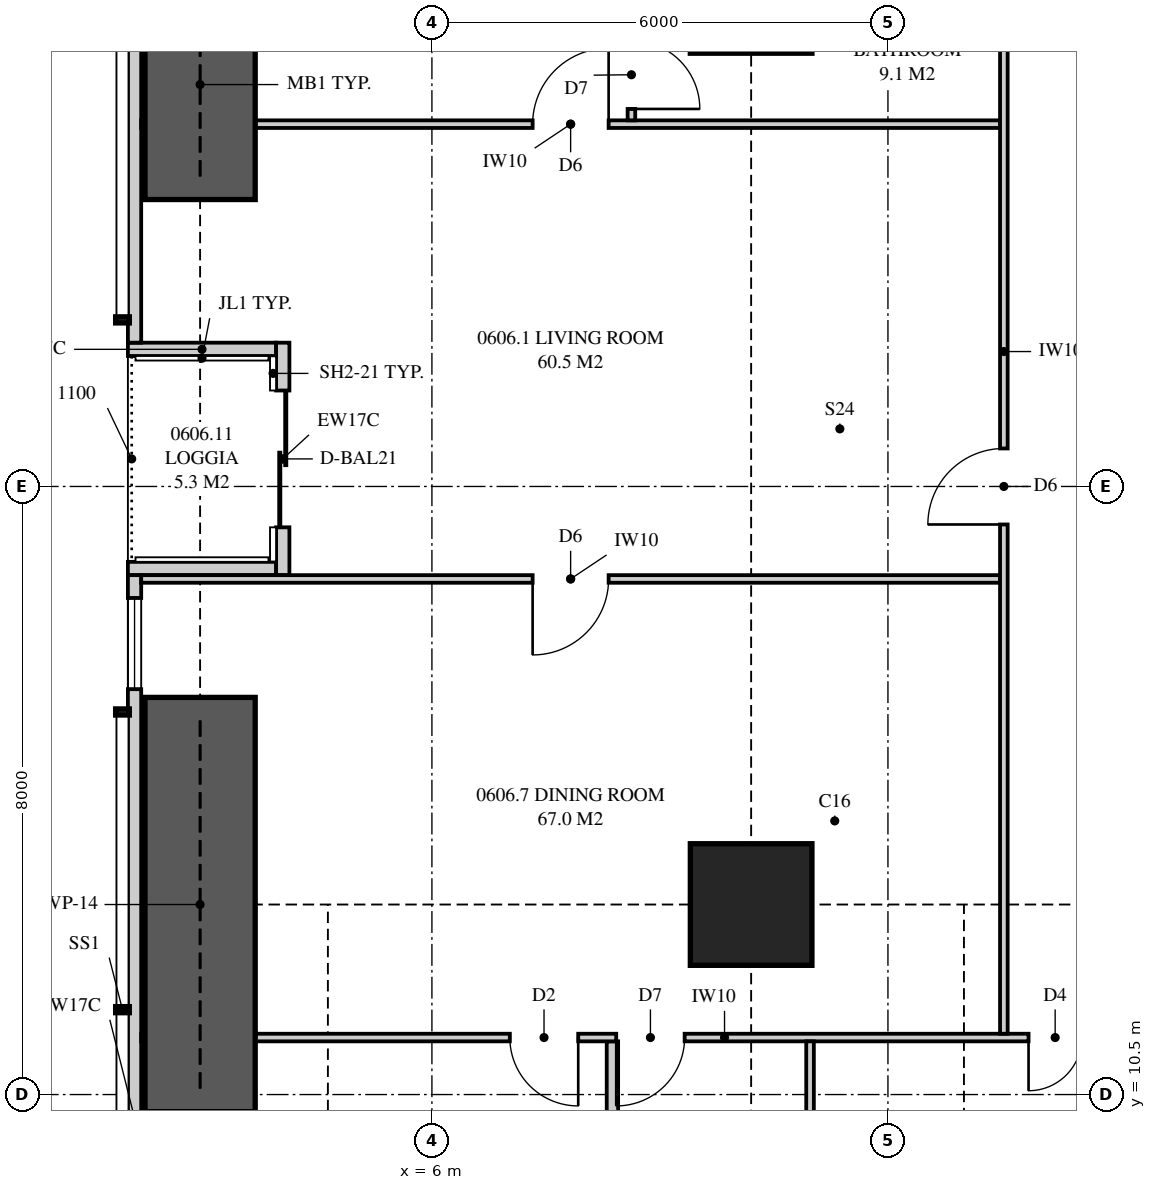
"""IFC4 building model, lengths in metres.
Left out: names, types, materials, properties, quantities, classifications, styles, units other than length and angle.
Written with IfcOpenShell. Run it as: python <this file> out.ifc"""

import sys

from ifc_helpers import new_model, si_unit, direction, frame, frame_2d, origin, origin_2d, place, context, subcontext, project, spatial, polyline, rectangle, outline, extrude, element, fill, save


model = new_model("IFC4")
c1 = context("Model", 3, precision=1e-05, world=origin(), true_north=direction((0.0, 1.0)))
c2 = subcontext(c1, "Body", "Model", "MODEL_VIEW")
j1 = project(units=[si_unit("LENGTHUNIT", "METRE"), si_unit("PLANEANGLEUNIT", "RADIAN")], contexts=[c1])
p1 = place(None, origin())
s1 = spatial("IfcSite", under=j1, at=p1, CompositionType="ELEMENT")
p2 = place(p1, origin())
s2 = spatial("IfcBuilding", under=s1, at=p2, CompositionType="ELEMENT")
p3 = place(p2, frame((0.0, 0.0, 27.7)))
s3 = spatial("IfcBuildingStorey", under=s2, at=p3, CompositionType="ELEMENT", Elevation=27.7)
for number, where, z_axis, x_axis in (
    (1, (10.2, 13.0, 0.0), (0.0, 0.0, 1.0), (1.0, 0.0, 0.0)),
    (2, (10.2, 25.0, 0.0), (0.0, 0.0, 1.0), (1.0, 0.0, 0.0)),
):
    element("IfcColumn", number, at=place(p3, frame(where, z_axis=z_axis, x_axis=x_axis)), inside=s3, PredefinedType="COLUMN", context=c2, shape_type="SweptSolid", body=[
        extrude(rectangle(XDim=1.6, YDim=1.6, at=origin_2d()), origin(), (0.0, 0.0, 1.0), 3.35),
    ])
p4 = place(p3, frame((2.087, 34.949, 0.0), z_axis=(0.0, 0.0, 1.0), x_axis=(0.0, -1.0, 0.0)))
e3 = element("IfcWall", 3, at=p4, inside=s3, PredefinedType="SOLIDWALL", context=c2, shape_type="SweptSolid", body=[
    extrude(outline(polyline([(0.0, 0.0), (14.557, 0.0), (14.557, 2.15), (9.949, 2.15), (9.949, 3.11), (9.823, 3.11), (9.823, 2.15), (9.73, 2.15), (9.73, 3.11), (0.0, 3.11), (0.0, 0.0)])), frame((0.0, 0.087, 0.0), z_axis=(0.0, -1.0, 0.0), x_axis=(1.0, 0.0, 0.0)), (0.0, 0.0, 1.0), 0.175),
])
p5 = place(p4, frame((2.757, 0.0, 0.4)))
e4 = element("IfcOpeningElement", 4, at=p5, cuts=e3, PredefinedType="OPENING", context=c2, shape_type="SweptSolid", body=[
    extrude(rectangle(XDim=1.8, YDim=1.7, at=frame_2d((0.9, 0.85))), frame((0.0, 0.097, 0.0), z_axis=(0.0, -1.0, 0.0), x_axis=(1.0, 0.0, 0.0)), (0.0, 0.0, 1.0), 0.195),
])
p6 = place(p4, frame((5.899, 0.0, 0.4)))
e5 = element("IfcOpeningElement", 5, at=p6, cuts=e3, PredefinedType="OPENING", context=c2, shape_type="SweptSolid", body=[
    extrude(rectangle(XDim=1.2, YDim=1.7, at=frame_2d((0.6, 0.85))), frame((0.0, 0.097, 0.0), z_axis=(0.0, -1.0, 0.0), x_axis=(1.0, 0.0, 0.0)), (0.0, 0.0, 1.0), 0.195),
])
p7 = place(p3, frame((2.087, 17.333, 0.0), z_axis=(0.0, 0.0, 1.0), x_axis=(0.0, -1.0, 0.0)))
e6 = element("IfcWall", 6, at=p7, inside=s3, PredefinedType="SOLIDWALL", context=c2, shape_type="SweptSolid", body=[
    extrude(outline(polyline([(0.0, 0.0), (14.282, 0.0), (14.282, 3.11), (4.552, 3.11), (4.552, 2.15), (4.459, 2.15), (4.459, 3.11), (4.333, 3.11), (4.333, 2.15), (0.0, 2.15), (0.0, 0.0)])), frame((0.0, 0.087, 0.0), z_axis=(0.0, -1.0, 0.0), x_axis=(1.0, 0.0, 0.0)), (0.0, 0.0, 1.0), 0.175),
])
p8 = place(p7, frame((0.3, 0.0, 0.4)))
e7 = element("IfcOpeningElement", 7, at=p8, cuts=e6, PredefinedType="OPENING", context=c2, shape_type="SweptSolid", body=[
    extrude(rectangle(XDim=1.2, YDim=1.7, at=frame_2d((0.6, 0.85))), frame((0.0, 0.097, 0.0), z_axis=(0.0, -1.0, 0.0), x_axis=(1.0, 0.0, 0.0)), (0.0, 0.0, 1.0), 0.195),
])
p9 = place(p7, frame((7.158, 0.0, 0.4)))
e8 = element("IfcOpeningElement", 8, at=p9, cuts=e6, PredefinedType="OPENING", context=c2, shape_type="SweptSolid", body=[
    extrude(rectangle(XDim=1.8, YDim=1.7, at=frame_2d((0.9, 0.85))), frame((0.0, 0.097, 0.0), z_axis=(0.0, -1.0, 0.0), x_axis=(1.0, 0.0, 0.0)), (0.0, 0.0, 1.0), 0.195),
])
p10 = place(p7, frame((10.225, 0.0, 0.4)))
e9 = element("IfcOpeningElement", 9, at=p10, cuts=e6, PredefinedType="OPENING", context=c2, shape_type="SweptSolid", body=[
    extrude(rectangle(XDim=1.8, YDim=1.7, at=frame_2d((0.9, 0.85))), frame((0.0, 0.097, 0.0), z_axis=(0.0, -1.0, 0.0), x_axis=(1.0, 0.0, 0.0)), (0.0, 0.0, 1.0), 0.195),
])
p11 = place(p3, frame((4.038, 20.392, 0.0), z_axis=(0.0, 0.0, 1.0), x_axis=(0.0, -1.0, 0.0)))
e10 = element("IfcWall", 10, at=p11, inside=s3, PredefinedType="SOLIDWALL", context=c2, shape_type="SweptSolid", body=[
    extrude(rectangle(XDim=3.058, YDim=0.175, at=frame_2d((1.529, 0.0))), origin(), (0.0, 0.0, 1.0), 3.11),
])
p12 = place(p11, frame((0.629, 0.0, 0.0)))
e11 = element("IfcOpeningElement", 11, at=p12, cuts=e10, PredefinedType="OPENING", context=c2, shape_type="SweptSolid", body=[
    extrude(rectangle(XDim=1.8, YDim=2.1, at=frame_2d((0.9, 1.05))), frame((0.0, 0.097, 0.0), z_axis=(0.0, -1.0, 0.0), x_axis=(1.0, 0.0, 0.0)), (0.0, 0.0, 1.0), 0.195),
])
for number, where, z_axis, x_axis in (
    (12, (2.0, 20.304, 0.0), (0.0, 0.0, 1.0), (1.0, 0.0, 0.0)),
    (13, (2.0, 17.421, 0.0), (0.0, 0.0, 1.0), (1.0, 0.0, 0.0)),
):
    element("IfcWall", number, at=place(p3, frame(where, z_axis=z_axis, x_axis=x_axis)), inside=s3, PredefinedType="SOLIDWALL", context=c2, shape_type="SweptSolid", body=[
        extrude(outline(polyline([(0.0, 0.0), (1.95, 0.0), (1.95, 3.11), (1.75, 3.11), (1.75, 2.15), (0.15, 2.15), (0.15, 3.11), (0.0, 3.11), (0.0, 0.0)])), frame((0.0, 0.087, 0.0), z_axis=(0.0, -1.0, 0.0), x_axis=(1.0, 0.0, 0.0)), (0.0, 0.0, 1.0), 0.175),
    ])
p13 = place(p3, frame((2.175, 11.25, 0.0), z_axis=(0.0, 0.0, 1.0), x_axis=(1.0, 0.0, 0.0)))
e14 = element("IfcWall", 14, at=p13, inside=s3, PredefinedType="PARTITIONING", context=c2, shape_type="SweptSolid", body=[
    extrude(outline(polyline([(0.188, 3.11), (0.0, 3.11), (0.0, 0.0), (0.529, 0.0), (0.529, 0.263), (1.021, 0.263), (1.021, 0.0), (15.35, 0.0), (15.35, 3.11), (11.112, 3.11), (11.112, 2.541), (10.538, 2.541), (10.538, 3.11), (9.285, 3.11), (9.285, 2.51), (6.765, 2.51), (6.765, 3.11), (2.744, 3.11), (2.744, 2.541), (2.169, 2.541), (2.169, 3.11), (1.93, 3.11), (1.93, 2.15), (1.021, 2.15), (1.021, 1.887), (0.529, 1.887), (0.529, 2.15), (0.188, 2.15), (0.188, 3.11)])), frame((0.0, 0.05, 0.0), z_axis=(0.0, -1.0, 0.0), x_axis=(1.0, 0.0, 0.0)), (0.0, 0.0, 1.0), 0.1),
])
p14 = place(p13, frame((4.85, 0.0, 0.0)))
e15 = element("IfcOpeningElement", 15, at=p14, cuts=e14, PredefinedType="OPENING", context=c2, shape_type="SweptSolid", body=[
    extrude(rectangle(XDim=0.9, YDim=2.1, at=frame_2d((0.45, 1.05))), frame((0.0, 0.06, 0.0), z_axis=(0.0, -1.0, 0.0), x_axis=(1.0, 0.0, 0.0)), (0.0, 0.0, 1.0), 0.12),
])
p15 = place(p13, frame((6.25, 0.0, 0.0)))
e16 = element("IfcOpeningElement", 16, at=p15, cuts=e14, PredefinedType="OPENING", context=c2, shape_type="SweptSolid", body=[
    extrude(rectangle(XDim=0.9, YDim=2.1, at=frame_2d((0.45, 1.05))), frame((0.0, 0.06, 0.0), z_axis=(0.0, -1.0, 0.0), x_axis=(1.0, 0.0, 0.0)), (0.0, 0.0, 1.0), 0.12),
])
p16 = place(p13, frame((11.675, 0.0, 0.0)))
e17 = element("IfcOpeningElement", 17, at=p16, cuts=e14, PredefinedType="OPENING", context=c2, shape_type="SweptSolid", body=[
    extrude(rectangle(XDim=0.7, YDim=2.1, at=frame_2d((0.35, 1.05))), frame((0.0, 0.06, 0.0), z_axis=(0.0, -1.0, 0.0), x_axis=(1.0, 0.0, 0.0)), (0.0, 0.0, 1.0), 0.12),
])
p17 = place(p3, frame((8.375, 7.75, 0.0), z_axis=(0.0, 0.0, 1.0), x_axis=(0.0, 1.0, 0.0)))
e18 = element("IfcWall", 18, at=p17, inside=s3, PredefinedType="PLUMBINGWALL", context=c2, shape_type="SweptSolid", body=[
    extrude(rectangle(XDim=3.45, YDim=0.15, at=frame_2d((1.725, 0.0))), origin(), (0.0, 0.0, 1.0), 3.11),
])
p18 = place(p3, frame((10.975, 7.75, 0.0), z_axis=(0.0, 0.0, 1.0), x_axis=(0.0, 1.0, 0.0)))
e19 = element("IfcWall", 19, at=p18, inside=s3, PredefinedType="PARTITIONING", context=c2, shape_type="SweptSolid", body=[
    extrude(outline(polyline([(0.0, 0.0), (3.45, 0.0), (3.45, 3.11), (3.45, 2.51), (0.0, 2.51), (0.0, 3.11), (0.0, 0.0)])), frame((0.0, 0.05, 0.0), z_axis=(0.0, -1.0, 0.0), x_axis=(1.0, 0.0, 0.0)), (0.0, 0.0, 1.0), 0.1),
])
p19 = place(p3, frame((13.525, 11.3, 0.0), z_axis=(0.0, 0.0, 1.0), x_axis=(0.0, 1.0, 0.0)))
e20 = element("IfcWall", 20, at=p19, inside=s3, PredefinedType="PARTITIONING", context=c2, shape_type="SweptSolid", body=[
    extrude(outline(polyline([(0.0, 0.0), (17.95, 0.0), (17.95, 3.11), (13.987, 3.11), (13.987, 2.541), (13.413, 2.541), (13.413, 3.11), (1.987, 3.11), (1.987, 2.541), (1.413, 2.541), (1.413, 3.11), (0.0, 3.11), (0.0, 0.0)])), frame((0.0, 0.05, 0.0), z_axis=(0.0, -1.0, 0.0), x_axis=(1.0, 0.0, 0.0)), (0.0, 0.0, 1.0), 0.1),
])
p20 = place(p19, frame((6.7, 0.0, 0.0)))
e21 = element("IfcOpeningElement", 21, at=p20, cuts=e20, PredefinedType="OPENING", context=c2, shape_type="SweptSolid", body=[
    extrude(rectangle(XDim=1.0, YDim=2.1, at=frame_2d((0.5, 1.05))), frame((0.0, 0.06, 0.0), z_axis=(0.0, -1.0, 0.0), x_axis=(1.0, 0.0, 0.0)), (0.0, 0.0, 1.0), 0.12),
])
p21 = place(p3, frame((2.175, 17.283, 0.0), z_axis=(0.0, 0.0, 1.0), x_axis=(1.0, 0.0, 0.0)))
e22 = element("IfcWall", 22, at=p21, inside=s3, PredefinedType="PARTITIONING", context=c2, shape_type="SweptSolid", body=[
    extrude(outline(polyline([(0.0, 0.0), (11.3, 0.0), (11.3, 3.11), (9.285, 3.11), (9.285, 2.51), (6.765, 2.51), (6.765, 3.11), (1.635, 3.11), (1.635, 2.15), (0.0, 2.15), (0.0, 3.11), (0.0, 0.0)])), frame((0.0, 0.05, 0.0), z_axis=(0.0, -1.0, 0.0), x_axis=(1.0, 0.0, 0.0)), (0.0, 0.0, 1.0), 0.1),
])
p22 = place(p21, frame((5.15, 0.0, 0.0)))
e23 = element("IfcOpeningElement", 23, at=p22, cuts=e22, PredefinedType="OPENING", context=c2, shape_type="SweptSolid", body=[
    extrude(rectangle(XDim=1.0, YDim=2.1, at=frame_2d((0.5, 1.05))), frame((0.0, 0.06, 0.0), z_axis=(0.0, -1.0, 0.0), x_axis=(1.0, 0.0, 0.0)), (0.0, 0.0, 1.0), 0.12),
])
p23 = place(p3, frame((2.175, 23.267, 0.0), z_axis=(0.0, 0.0, 1.0), x_axis=(1.0, 0.0, 0.0)))
e24 = element("IfcWall", 24, at=p23, inside=s3, PredefinedType="PARTITIONING", context=c2, shape_type="SweptSolid", body=[
    extrude(outline(polyline([(0.529, 2.15), (0.0, 2.15), (0.0, 0.0), (0.529, 0.0), (0.529, 0.274), (1.021, 0.274), (1.021, 0.0), (11.3, 0.0), (11.3, 3.11), (9.285, 3.11), (9.285, 2.51), (6.765, 2.51), (6.765, 3.11), (1.635, 3.11), (1.635, 2.15), (1.021, 2.15), (1.021, 1.876), (0.529, 1.876), (0.529, 2.15)])), frame((0.0, 0.05, 0.0), z_axis=(0.0, -1.0, 0.0), x_axis=(1.0, 0.0, 0.0)), (0.0, 0.0, 1.0), 0.1),
])
p24 = place(p23, frame((5.15, 0.0, 0.0)))
e25 = element("IfcOpeningElement", 25, at=p24, cuts=e24, PredefinedType="OPENING", context=c2, shape_type="SweptSolid", body=[
    extrude(rectangle(XDim=1.0, YDim=2.1, at=frame_2d((0.5, 1.05))), frame((0.0, 0.06, 0.0), z_axis=(0.0, -1.0, 0.0), x_axis=(1.0, 0.0, 0.0)), (0.0, 0.0, 1.0), 0.12),
])
p25 = place(p3, frame((8.625, 23.317, 0.0), z_axis=(0.0, 0.0, 1.0), x_axis=(0.0, 1.0, 0.0)))
e26 = element("IfcWall", 26, at=p25, inside=s3, PredefinedType="PARTITIONING", context=c2, shape_type="SweptSolid", body=[
    extrude(outline(polyline([(0.0, 0.0), (5.933, 0.0), (5.933, 3.11), (1.971, 3.11), (1.971, 2.541), (1.396, 2.541), (1.396, 3.11), (0.0, 3.11), (0.0, 0.0)])), frame((0.0, 0.05, 0.0), z_axis=(0.0, -1.0, 0.0), x_axis=(1.0, 0.0, 0.0)), (0.0, 0.0, 1.0), 0.1),
])
p26 = place(p25, frame((0.15, 0.0, 0.0)))
e27 = element("IfcOpeningElement", 27, at=p26, cuts=e26, PredefinedType="OPENING", context=c2, shape_type="SweptSolid", body=[
    extrude(rectangle(XDim=0.9, YDim=2.1, at=frame_2d((0.45, 1.05))), frame((0.0, 0.06, 0.0), z_axis=(0.0, -1.0, 0.0), x_axis=(1.0, 0.0, 0.0)), (0.0, 0.0, 1.0), 0.12),
])
p27 = place(p25, frame((4.042, 0.0, 0.0)))
e28 = element("IfcOpeningElement", 28, at=p27, cuts=e26, PredefinedType="OPENING", context=c2, shape_type="SweptSolid", body=[
    extrude(rectangle(XDim=0.9, YDim=2.1, at=frame_2d((0.45, 1.05))), frame((0.0, 0.06, 0.0), z_axis=(0.0, -1.0, 0.0), x_axis=(1.0, 0.0, 0.0)), (0.0, 0.0, 1.0), 0.12),
])
for number, where, z_axis, x_axis in (
    (29, (2.95, 22.275, 0.0), (0.0, 0.0, 1.0), (0.0, 1.0, 0.0)),
    (30, (2.95, 10.275, 0.0), (0.0, 0.0, 1.0), (0.0, 1.0, 0.0)),
):
    element("IfcWall", number, at=place(p3, frame(where, z_axis=z_axis, x_axis=x_axis)), inside=s3, PredefinedType="SHEAR", context=c2, shape_type="SweptSolid", body=[
        extrude(rectangle(XDim=5.45, YDim=1.45, at=frame_2d((2.725, 0.0))), origin(), (0.0, 0.0, 1.0), 3.35),
    ])
p28 = place(p12, origin())
e31 = element("IfcDoor", 31, at=p28, inside=s3, OperationType="SLIDING_TO_LEFT", PredefinedType="DOOR", context=c2, shape_type="SweptSolid", body=[
    extrude(rectangle(XDim=1.8, YDim=2.1, at=frame_2d((0.9, 1.05))), frame((0.0, 0.025, 0.0), z_axis=(0.0, -1.0, 0.0), x_axis=(1.0, 0.0, 0.0)), (0.0, 0.0, 1.0), 0.05),
])
fill(e11, e31)
p29 = place(p8, origin())
e32 = element("IfcWindow", 32, at=p29, inside=s3, PartitioningType="SINGLE_PANEL", PredefinedType="WINDOW", context=c2, shape_type="SweptSolid", body=[
    extrude(rectangle(XDim=1.2, YDim=1.7, at=frame_2d((0.6, 0.85))), frame((0.0, 0.03, 0.0), z_axis=(0.0, -1.0, 0.0), x_axis=(1.0, 0.0, 0.0)), (0.0, 0.0, 1.0), 0.06),
])
fill(e7, e32)
p30 = place(p14, frame((0.9, 0.0, 0.0), z_axis=(0.0, 0.0, 1.0), x_axis=(-1.0, 0.0, 0.0)))
e33 = element("IfcDoor", 33, at=p30, inside=s3, OperationType="SINGLE_SWING_LEFT", PredefinedType="DOOR", context=c2, shape_type="SweptSolid", body=[
    extrude(rectangle(XDim=0.9, YDim=2.1, at=frame_2d((0.45, 1.05))), frame((0.0, 0.025, 0.0), z_axis=(0.0, -1.0, 0.0), x_axis=(1.0, 0.0, 0.0)), (0.0, 0.0, 1.0), 0.05),
])
fill(e15, e33)
p31 = place(p15, frame((0.9, 0.0, 0.0), z_axis=(0.0, 0.0, 1.0), x_axis=(-1.0, 0.0, 0.0)))
e34 = element("IfcDoor", 34, at=p31, inside=s3, OperationType="SINGLE_SWING_RIGHT", PredefinedType="DOOR", context=c2, shape_type="SweptSolid", body=[
    extrude(rectangle(XDim=0.9, YDim=2.1, at=frame_2d((0.45, 1.05))), frame((0.0, 0.025, 0.0), z_axis=(0.0, -1.0, 0.0), x_axis=(1.0, 0.0, 0.0)), (0.0, 0.0, 1.0), 0.05),
])
fill(e16, e34)
p32 = place(p16, frame((0.7, 0.0, 0.0), z_axis=(0.0, 0.0, 1.0), x_axis=(-1.0, 0.0, 0.0)))
e35 = element("IfcDoor", 35, at=p32, inside=s3, OperationType="SINGLE_SWING_RIGHT", PredefinedType="DOOR", context=c2, shape_type="SweptSolid", body=[
    extrude(rectangle(XDim=0.7, YDim=2.1, at=frame_2d((0.35, 1.05))), frame((0.0, 0.025, 0.0), z_axis=(0.0, -1.0, 0.0), x_axis=(1.0, 0.0, 0.0)), (0.0, 0.0, 1.0), 0.05),
])
fill(e17, e35)
p33 = place(p20, origin())
e36 = element("IfcDoor", 36, at=p33, inside=s3, OperationType="SINGLE_SWING_LEFT", PredefinedType="DOOR", context=c2, shape_type="SweptSolid", body=[
    extrude(rectangle(XDim=1.0, YDim=2.1, at=frame_2d((0.5, 1.05))), frame((0.0, 0.025, 0.0), z_axis=(0.0, -1.0, 0.0), x_axis=(1.0, 0.0, 0.0)), (0.0, 0.0, 1.0), 0.05),
])
fill(e21, e36)
p34 = place(p22, frame((1.0, 0.0, 0.0), z_axis=(0.0, 0.0, 1.0), x_axis=(-1.0, 0.0, 0.0)))
e37 = element("IfcDoor", 37, at=p34, inside=s3, OperationType="SINGLE_SWING_RIGHT", PredefinedType="DOOR", context=c2, shape_type="SweptSolid", body=[
    extrude(rectangle(XDim=1.0, YDim=2.1, at=frame_2d((0.5, 1.05))), frame((0.0, 0.025, 0.0), z_axis=(0.0, -1.0, 0.0), x_axis=(1.0, 0.0, 0.0)), (0.0, 0.0, 1.0), 0.05),
])
fill(e23, e37)
p35 = place(p24, origin())
e38 = element("IfcDoor", 38, at=p35, inside=s3, OperationType="SINGLE_SWING_RIGHT", PredefinedType="DOOR", context=c2, shape_type="SweptSolid", body=[
    extrude(rectangle(XDim=1.0, YDim=2.1, at=frame_2d((0.5, 1.05))), frame((0.0, 0.025, 0.0), z_axis=(0.0, -1.0, 0.0), x_axis=(1.0, 0.0, 0.0)), (0.0, 0.0, 1.0), 0.05),
])
fill(e25, e38)
p36 = place(p26, frame((0.9, 0.0, 0.0), z_axis=(0.0, 0.0, 1.0), x_axis=(-1.0, 0.0, 0.0)))
e39 = element("IfcDoor", 39, at=p36, inside=s3, OperationType="SINGLE_SWING_RIGHT", PredefinedType="DOOR", context=c2, shape_type="SweptSolid", body=[
    extrude(rectangle(XDim=0.9, YDim=2.1, at=frame_2d((0.45, 1.05))), frame((0.0, 0.025, 0.0), z_axis=(0.0, -1.0, 0.0), x_axis=(1.0, 0.0, 0.0)), (0.0, 0.0, 1.0), 0.05),
])
fill(e27, e39)
save(model, sys.argv[1])
